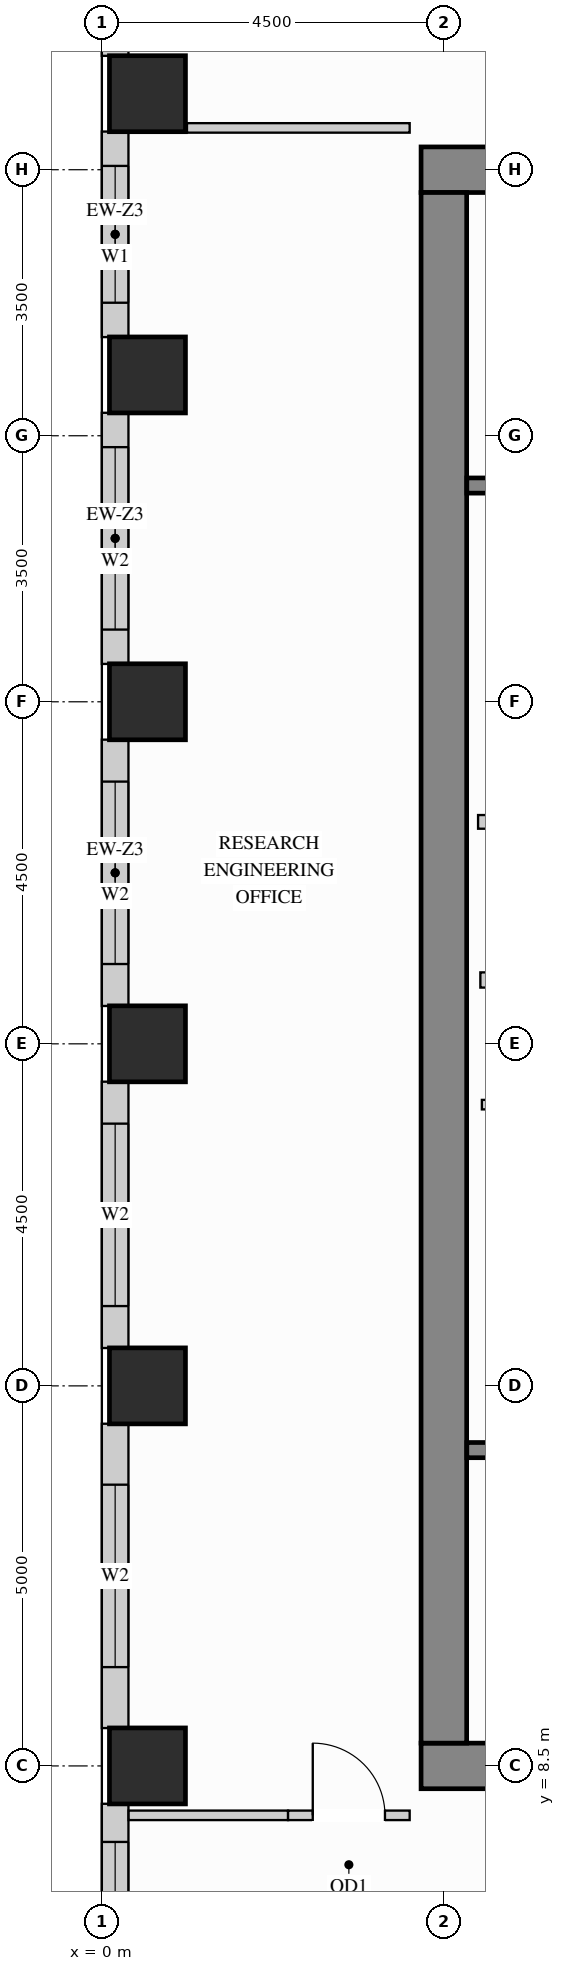
"""IFC4 building model, lengths in metres.
Left out: names, types, materials, properties, quantities, classifications, styles, units other than length and angle.
Written with IfcOpenShell. Run it as: python <this file> out.ifc"""

import sys

from ifc_helpers import new_model, si_unit, direction, frame, frame_2d, origin, origin_2d, place, context, subcontext, project, spatial, rectangle, extrude, source, transform, mapped, element, fill, save


model = new_model("IFC4")
c1 = context("Model", 3, precision=1e-05, world=origin(), true_north=direction((0.0, 1.0)))
c2 = subcontext(c1, "Body", "Model", "MODEL_VIEW")
j1 = project(units=[si_unit("LENGTHUNIT", "METRE"), si_unit("PLANEANGLEUNIT", "RADIAN")], contexts=[c1])
p1 = place(None, origin())
s1 = spatial("IfcSite", under=j1, at=p1, CompositionType="ELEMENT")
p2 = place(p1, origin())
s2 = spatial("IfcBuilding", under=s1, at=p2, CompositionType="ELEMENT")
p3 = place(p2, frame((0.0, 0.0, 161.1)))
s3 = spatial("IfcBuildingStorey", under=s2, at=p3, CompositionType="ELEMENT", Elevation=161.1)
m1 = source(origin(), c2, "Body", "SweptSolid", [
    extrude(rectangle(XDim=1.0, YDim=1.0, at=origin_2d()), origin(), (0.0, 0.0, 1.0), 3.4),
])
for number, where, z_axis, x_axis in (
    (1, (0.6, 13.5, 0.0), (0.0, 0.0, 1.0), (1.0, 0.0, 0.0)),
    (2, (0.6, 18.0, 0.0), (0.0, 0.0, 1.0), (1.0, 0.0, 0.0)),
    (3, (0.6, 22.5, 0.0), (0.0, 0.0, 1.0), (1.0, 0.0, 0.0)),
    (4, (0.6, 26.8, 0.0), (0.0, 0.0, 1.0), (1.0, 0.0, 0.0)),
    (5, (0.6, 30.5, 0.0), (0.0, 0.0, 1.0), (1.0, 0.0, 0.0)),
    (6, (0.6, 8.5, 0.0), (0.0, 0.0, 1.0), (1.0, 0.0, 0.0)),
):
    element("IfcColumn", number, at=place(p3, frame(where, z_axis=z_axis, x_axis=x_axis)), inside=s3, PredefinedType="COLUMN", context=c2, shape_type="MappedRepresentation", body=[
        mapped(m1, transform((0.0, 0.0, 0.0), x_axis=(1.0, 0.0, 0.0), y_axis=(0.0, 1.0, 0.0), z_axis=(0.0, 0.0, 1.0))),
    ])
m2 = source(origin(), c2, "Body", "SweptSolid", [
    extrude(rectangle(XDim=10.6, YDim=0.6, at=frame_2d((5.3, 0.0))), origin(), (0.0, 0.0, 1.0), 3.4),
])
for number, where, z_axis, x_axis in (
    (7, (4.2, 29.5, 0.0), (0.0, 0.0, 1.0), (1.0, 0.0, 0.0)),
    (8, (4.2, 8.5, 0.0), (0.0, 0.0, 1.0), (1.0, 0.0, 0.0)),
):
    element("IfcWall", number, at=place(p3, frame(where, z_axis=z_axis, x_axis=x_axis)), inside=s3, PredefinedType="SHEAR", context=c2, shape_type="MappedRepresentation", body=[
        mapped(m2, transform((0.0, 0.0, 0.0), x_axis=(1.0, 0.0, 0.0), y_axis=(0.0, 1.0, 0.0), z_axis=(0.0, 0.0, 1.0))),
    ])
m3 = source(origin(), c2, "Body", "SweptSolid", [
    extrude(rectangle(XDim=20.4, YDim=0.6, at=frame_2d((10.2, 0.0))), origin(), (0.0, 0.0, 1.0), 3.4),
])
p4 = place(p3, frame((4.5, 8.8, 0.0), z_axis=(0.0, 0.0, 1.0), x_axis=(0.0, 1.0, 0.0)))
e9 = element("IfcWall", 9, at=p4, inside=s3, PredefinedType="SHEAR", context=c2, shape_type="MappedRepresentation", body=[
    mapped(m3, transform((0.0, 0.0, 0.0), x_axis=(1.0, 0.0, 0.0), y_axis=(0.0, 1.0, 0.0), z_axis=(0.0, 0.0, 1.0))),
])
p5 = place(p3, frame((0.175, 34.502, 0.0), z_axis=(0.0, 0.0, 1.0), x_axis=(0.0, -1.0, 0.0)))
e10 = element("IfcWall", 10, at=p5, inside=s3, PredefinedType="SOLIDWALL", context=c2, shape_type="SweptSolid", body=[
    extrude(rectangle(XDim=3.504, YDim=0.35, at=frame_2d((1.752, 0.0))), origin(), (0.0, 0.0, 1.0), 2.612),
])
p6 = place(p5, frame((0.511, 0.0, 0.78)))
e11 = element("IfcOpeningElement", 11, at=p6, cuts=e10, PredefinedType="OPENING", context=c2, shape_type="SweptSolid", body=[
    extrude(rectangle(XDim=1.2, YDim=1.652, at=frame_2d((0.6, 0.826))), frame((0.0, 0.185, 0.0), z_axis=(0.0, -1.0, 0.0), x_axis=(1.0, 0.0, 0.0)), (0.0, 0.0, 1.0), 0.37),
])
p7 = place(p3, frame((0.175, 30.002, 0.0), z_axis=(0.0, 0.0, 1.0), x_axis=(0.0, -1.0, 0.0)))
e12 = element("IfcWall", 12, at=p7, inside=s3, PredefinedType="SOLIDWALL", context=c2, shape_type="SweptSolid", body=[
    extrude(rectangle(XDim=2.704, YDim=0.35, at=frame_2d((1.352, 0.0))), origin(), (0.0, 0.0, 1.0), 2.612),
])
p8 = place(p7, frame((0.452, 0.0, 0.78)))
e13 = element("IfcOpeningElement", 13, at=p8, cuts=e12, PredefinedType="OPENING", context=c2, shape_type="SweptSolid", body=[
    extrude(rectangle(XDim=1.8, YDim=1.652, at=frame_2d((0.9, 0.826))), frame((0.0, 0.185, 0.0), z_axis=(0.0, -1.0, 0.0), x_axis=(1.0, 0.0, 0.0)), (0.0, 0.0, 1.0), 0.37),
])
p9 = place(p3, frame((0.175, 26.302, 0.0), z_axis=(0.0, 0.0, 1.0), x_axis=(0.0, -1.0, 0.0)))
e14 = element("IfcWall", 14, at=p9, inside=s3, PredefinedType="SOLIDWALL", context=c2, shape_type="SweptSolid", body=[
    extrude(rectangle(XDim=3.304, YDim=0.35, at=frame_2d((1.652, 0.0))), origin(), (0.0, 0.0, 1.0), 2.612),
])
p10 = place(p9, frame((0.452, 0.0, 0.78)))
e15 = element("IfcOpeningElement", 15, at=p10, cuts=e14, PredefinedType="OPENING", context=c2, shape_type="SweptSolid", body=[
    extrude(rectangle(XDim=2.4, YDim=1.652, at=frame_2d((1.2, 0.826))), frame((0.0, 0.185, 0.0), z_axis=(0.0, -1.0, 0.0), x_axis=(1.0, 0.0, 0.0)), (0.0, 0.0, 1.0), 0.37),
])
p11 = place(p3, frame((0.175, 22.002, 0.0), z_axis=(0.0, 0.0, 1.0), x_axis=(0.0, -1.0, 0.0)))
e16 = element("IfcWall", 16, at=p11, inside=s3, PredefinedType="SOLIDWALL", context=c2, shape_type="SweptSolid", body=[
    extrude(rectangle(XDim=3.504, YDim=0.35, at=frame_2d((1.752, 0.0))), origin(), (0.0, 0.0, 1.0), 2.612),
])
p12 = place(p11, frame((0.552, 0.0, 0.78)))
e17 = element("IfcOpeningElement", 17, at=p12, cuts=e16, PredefinedType="OPENING", context=c2, shape_type="SweptSolid", body=[
    extrude(rectangle(XDim=2.4, YDim=1.652, at=frame_2d((1.2, 0.826))), frame((0.0, 0.185, 0.0), z_axis=(0.0, -1.0, 0.0), x_axis=(1.0, 0.0, 0.0)), (0.0, 0.0, 1.0), 0.37),
])
p13 = place(p3, frame((0.175, 17.502, 0.0), z_axis=(0.0, 0.0, 1.0), x_axis=(0.0, -1.0, 0.0)))
e18 = element("IfcWall", 18, at=p13, inside=s3, PredefinedType="SOLIDWALL", context=c2, shape_type="SweptSolid", body=[
    extrude(rectangle(XDim=3.504, YDim=0.35, at=frame_2d((1.752, 0.0))), origin(), (0.0, 0.0, 1.0), 2.612),
])
p14 = place(p13, frame((0.552, 0.0, 0.78)))
e19 = element("IfcOpeningElement", 19, at=p14, cuts=e18, PredefinedType="OPENING", context=c2, shape_type="SweptSolid", body=[
    extrude(rectangle(XDim=2.4, YDim=1.652, at=frame_2d((1.2, 0.826))), frame((0.0, 0.185, 0.0), z_axis=(0.0, -1.0, 0.0), x_axis=(1.0, 0.0, 0.0)), (0.0, 0.0, 1.0), 0.37),
])
p15 = place(p3, frame((0.175, 13.002, 0.0), z_axis=(0.0, 0.0, 1.0), x_axis=(0.0, -1.0, 0.0)))
e20 = element("IfcWall", 20, at=p15, inside=s3, PredefinedType="SOLIDWALL", context=c2, shape_type="SweptSolid", body=[
    extrude(rectangle(XDim=4.004, YDim=0.35, at=frame_2d((2.002, 0.0))), origin(), (0.0, 0.0, 1.0), 2.612),
])
p16 = place(p15, frame((0.802, 0.0, 0.78)))
e21 = element("IfcOpeningElement", 21, at=p16, cuts=e20, PredefinedType="OPENING", context=c2, shape_type="SweptSolid", body=[
    extrude(rectangle(XDim=2.4, YDim=1.652, at=frame_2d((1.2, 0.826))), frame((0.0, 0.185, 0.0), z_axis=(0.0, -1.0, 0.0), x_axis=(1.0, 0.0, 0.0)), (0.0, 0.0, 1.0), 0.37),
])
p17 = place(p3, frame((0.175, 8.002, 0.0), z_axis=(0.0, 0.0, 1.0), x_axis=(0.0, -1.0, 0.0)))
e22 = element("IfcWall", 22, at=p17, inside=s3, PredefinedType="SOLIDWALL", context=c2, shape_type="SweptSolid", body=[
    extrude(rectangle(XDim=4.004, YDim=0.35, at=frame_2d((2.002, 0.0))), origin(), (0.0, 0.0, 1.0), 2.612),
])
p18 = place(p17, frame((0.502, 0.0, 0.78)))
e23 = element("IfcOpeningElement", 23, at=p18, cuts=e22, PredefinedType="OPENING", context=c2, shape_type="SweptSolid", body=[
    extrude(rectangle(XDim=1.8, YDim=1.652, at=frame_2d((0.9, 0.826))), frame((0.0, 0.185, 0.0), z_axis=(0.0, -1.0, 0.0), x_axis=(1.0, 0.0, 0.0)), (0.0, 0.0, 1.0), 0.37),
])
m4 = source(origin(), c2, "Body", "SweptSolid", [
    extrude(rectangle(XDim=2.2, YDim=0.18, at=frame_2d((1.1, 0.0))), origin(), (0.0, 0.0, 1.0), 3.385),
])
p19 = place(p3, frame((4.95, 20.92, 0.0), z_axis=(0.0, 0.0, 1.0), x_axis=(1.0, 0.0, 0.0)))
e24 = element("IfcWall", 24, at=p19, inside=s3, PredefinedType="PARTITIONING", context=c2, shape_type="MappedRepresentation", body=[
    mapped(m4, transform((0.0, 0.0, 0.0), x_axis=(1.0, 0.0, 0.0), y_axis=(0.0, 1.0, 0.0), z_axis=(0.0, 0.0, 1.0))),
])
p20 = place(p3, frame((5.0, 17.2, 0.0), z_axis=(0.0, 0.0, 1.0), x_axis=(1.0, 0.0, 0.0)))
e25 = element("IfcWall", 25, at=p20, inside=s3, PredefinedType="PARTITIONING", context=c2, shape_type="SweptSolid", body=[
    extrude(rectangle(XDim=2.4, YDim=0.125, at=frame_2d((1.2, 0.0))), origin(), (0.0, 0.0, 1.0), 3.385),
])
p21 = place(p20, frame((0.7, 0.0, 0.0)))
e26 = element("IfcOpeningElement", 26, at=p21, cuts=e25, PredefinedType="OPENING", context=c2, shape_type="SweptSolid", body=[
    extrude(rectangle(XDim=0.85, YDim=2.1, at=frame_2d((0.425, 1.05))), frame((0.0, 0.073, 0.0), z_axis=(0.0, -1.0, 0.0), x_axis=(1.0, 0.0, 0.0)), (0.0, 0.0, 1.0), 0.145),
])
m5 = source(origin(), c2, "Body", "SweptSolid", [
    extrude(rectangle(XDim=2.93, YDim=0.125, at=frame_2d((1.465, 0.0))), origin(), (0.0, 0.0, 1.0), 3.385),
])
p22 = place(p3, frame((1.12, 30.05, 0.0), z_axis=(0.0, 0.0, 1.0), x_axis=(1.0, 0.0, 0.0)))
e27 = element("IfcWall", 27, at=p22, inside=s3, PredefinedType="PARTITIONING", context=c2, shape_type="MappedRepresentation", body=[
    mapped(m5, transform((0.0, 0.0, 0.0), x_axis=(1.0, 0.0, 0.0), y_axis=(0.0, 1.0, 0.0), z_axis=(0.0, 0.0, 1.0))),
])
m6 = source(origin(), c2, "Body", "SweptSolid", [
    extrude(rectangle(XDim=2.098, YDim=0.125, at=frame_2d((1.049, 0.0))), origin(), (0.0, 0.0, 1.0), 3.385),
])
p23 = place(p3, frame((0.352, 7.85, 0.0), z_axis=(0.0, 0.0, 1.0), x_axis=(1.0, 0.0, 0.0)))
e28 = element("IfcWall", 28, at=p23, inside=s3, PredefinedType="PARTITIONING", context=c2, shape_type="MappedRepresentation", body=[
    mapped(m6, transform((0.0, 0.0, 0.0), x_axis=(1.0, 0.0, 0.0), y_axis=(0.0, 1.0, 0.0), z_axis=(0.0, 0.0, 1.0))),
])
p24 = place(p3, frame((2.45, 7.85, 0.0), z_axis=(0.0, 0.0, 1.0), x_axis=(1.0, 0.0, 0.0)))
e29 = element("IfcWall", 29, at=p24, inside=s3, PredefinedType="PARTITIONING", context=c2, shape_type="SweptSolid", body=[
    extrude(rectangle(XDim=1.6, YDim=0.125, at=frame_2d((0.8, 0.0))), origin(), (0.0, 0.0, 1.0), 3.385),
])
p25 = place(p24, frame((0.325, 0.0, 0.0)))
e30 = element("IfcOpeningElement", 30, at=p25, cuts=e29, PredefinedType="OPENING", context=c2, shape_type="SweptSolid", body=[
    extrude(rectangle(XDim=0.95, YDim=2.15, at=frame_2d((0.475, 1.075))), frame((0.0, 0.073, 0.0), z_axis=(0.0, -1.0, 0.0), x_axis=(1.0, 0.0, 0.0)), (0.0, 0.0, 1.0), 0.145),
])
m7 = source(origin(), c2, "Body", "SweptSolid", [
    extrude(rectangle(XDim=2.09, YDim=0.2, at=frame_2d((1.045, 0.0))), origin(), (0.0, 0.0, 1.0), 3.385),
])
p26 = place(p3, frame((4.98, 18.84, 0.0), z_axis=(0.0, 0.0, 1.0), x_axis=(1.0, 0.0, 0.0)))
e31 = element("IfcWall", 31, at=p26, inside=s3, PredefinedType="PARTITIONING", context=c2, shape_type="MappedRepresentation", body=[
    mapped(m7, transform((0.0, 0.0, 0.0), x_axis=(1.0, 0.0, 0.0), y_axis=(0.0, 1.0, 0.0), z_axis=(0.0, 0.0, 1.0))),
])
p27 = place(p3, frame((4.802, 12.655, 0.0), z_axis=(0.0, 0.0, 1.0), x_axis=(1.0, 0.0, 0.0)))
e32 = element("IfcWall", 32, at=p27, inside=s3, PredefinedType="SHEAR", context=c2, shape_type="SweptSolid", body=[
    extrude(rectangle(XDim=7.603, YDim=0.2, at=frame_2d((3.802, 0.0))), origin(), (0.0, 0.0, 1.0), 3.4),
])
p28 = place(p27, frame((0.4, 0.0, 0.0)))
e33 = element("IfcOpeningElement", 33, at=p28, cuts=e32, PredefinedType="OPENING", context=c2, shape_type="SweptSolid", body=[
    extrude(rectangle(XDim=1.1, YDim=2.15, at=frame_2d((0.55, 1.075))), frame((0.0, 0.11, 0.0), z_axis=(0.0, -1.0, 0.0), x_axis=(1.0, 0.0, 0.0)), (0.0, 0.0, 1.0), 0.22),
])
p29 = place(p3, frame((4.802, 25.345, 0.0), z_axis=(0.0, 0.0, 1.0), x_axis=(1.0, 0.0, 0.0)))
e34 = element("IfcWall", 34, at=p29, inside=s3, PredefinedType="SHEAR", context=c2, shape_type="SweptSolid", body=[
    extrude(rectangle(XDim=7.603, YDim=0.2, at=frame_2d((3.802, 0.0))), origin(), (0.0, 0.0, 1.0), 3.4),
])
p30 = place(p29, frame((0.4, 0.0, 0.0)))
e35 = element("IfcOpeningElement", 35, at=p30, cuts=e34, PredefinedType="OPENING", context=c2, shape_type="SweptSolid", body=[
    extrude(rectangle(XDim=1.1, YDim=2.15, at=frame_2d((0.55, 1.075))), frame((0.0, 0.11, 0.0), z_axis=(0.0, -1.0, 0.0), x_axis=(1.0, 0.0, 0.0)), (0.0, 0.0, 1.0), 0.22),
])
m8 = source(origin(), c2, "Body", "SweptSolid", [
    extrude(rectangle(XDim=0.95, YDim=2.15, at=frame_2d((0.475, 1.075))), frame((0.0, 0.025, 0.0), z_axis=(0.0, -1.0, 0.0), x_axis=(1.0, 0.0, 0.0)), (0.0, 0.0, 1.0), 0.05),
])
p31 = place(p25, origin())
e36 = element("IfcDoor", 36, at=p31, inside=s3, OperationType="SINGLE_SWING_LEFT", PredefinedType="DOOR", context=c2, shape_type="MappedRepresentation", body=[
    mapped(m8, transform((0.0, 0.0, 0.0), x_axis=(1.0, 0.0, 0.0), y_axis=(0.0, 1.0, 0.0), z_axis=(0.0, 0.0, 1.0))),
])
fill(e30, e36)
m9 = source(origin(), c2, "Body", "SweptSolid", [
    extrude(rectangle(XDim=1.8, YDim=1.652, at=frame_2d((0.9, 0.826))), frame((0.0, 0.03, 0.0), z_axis=(0.0, -1.0, 0.0), x_axis=(1.0, 0.0, 0.0)), (0.0, 0.0, 1.0), 0.06),
])
p32 = place(p8, origin())
e37 = element("IfcWindow", 37, at=p32, inside=s3, PartitioningType="SINGLE_PANEL", PredefinedType="WINDOW", context=c2, shape_type="MappedRepresentation", body=[
    mapped(m9, transform((0.0, 0.0, 0.0), x_axis=(1.0, 0.0, 0.0), y_axis=(0.0, 1.0, 0.0), z_axis=(0.0, 0.0, 1.0))),
])
fill(e13, e37)
p33 = place(p18, origin())
e38 = element("IfcWindow", 38, at=p33, inside=s3, PartitioningType="SINGLE_PANEL", PredefinedType="WINDOW", context=c2, shape_type="MappedRepresentation", body=[
    mapped(m9, transform((0.0, 0.0, 0.0), x_axis=(1.0, 0.0, 0.0), y_axis=(0.0, 1.0, 0.0), z_axis=(0.0, 0.0, 1.0))),
])
fill(e23, e38)
m10 = source(origin(), c2, "Body", "SweptSolid", [
    extrude(rectangle(XDim=2.4, YDim=1.652, at=frame_2d((1.2, 0.826))), frame((0.0, 0.03, 0.0), z_axis=(0.0, -1.0, 0.0), x_axis=(1.0, 0.0, 0.0)), (0.0, 0.0, 1.0), 0.06),
])
p34 = place(p10, origin())
e39 = element("IfcWindow", 39, at=p34, inside=s3, PartitioningType="SINGLE_PANEL", PredefinedType="WINDOW", context=c2, shape_type="MappedRepresentation", body=[
    mapped(m10, transform((0.0, 0.0, 0.0), x_axis=(1.0, 0.0, 0.0), y_axis=(0.0, 1.0, 0.0), z_axis=(0.0, 0.0, 1.0))),
])
fill(e15, e39)
p35 = place(p12, origin())
e40 = element("IfcWindow", 40, at=p35, inside=s3, PartitioningType="SINGLE_PANEL", PredefinedType="WINDOW", context=c2, shape_type="MappedRepresentation", body=[
    mapped(m10, transform((0.0, 0.0, 0.0), x_axis=(1.0, 0.0, 0.0), y_axis=(0.0, 1.0, 0.0), z_axis=(0.0, 0.0, 1.0))),
])
fill(e17, e40)
p36 = place(p14, origin())
e41 = element("IfcWindow", 41, at=p36, inside=s3, PartitioningType="SINGLE_PANEL", PredefinedType="WINDOW", context=c2, shape_type="MappedRepresentation", body=[
    mapped(m10, transform((0.0, 0.0, 0.0), x_axis=(1.0, 0.0, 0.0), y_axis=(0.0, 1.0, 0.0), z_axis=(0.0, 0.0, 1.0))),
])
fill(e19, e41)
p37 = place(p16, origin())
e42 = element("IfcWindow", 42, at=p37, inside=s3, PartitioningType="SINGLE_PANEL", PredefinedType="WINDOW", context=c2, shape_type="MappedRepresentation", body=[
    mapped(m10, transform((0.0, 0.0, 0.0), x_axis=(1.0, 0.0, 0.0), y_axis=(0.0, 1.0, 0.0), z_axis=(0.0, 0.0, 1.0))),
])
fill(e21, e42)
save(model, sys.argv[1])
